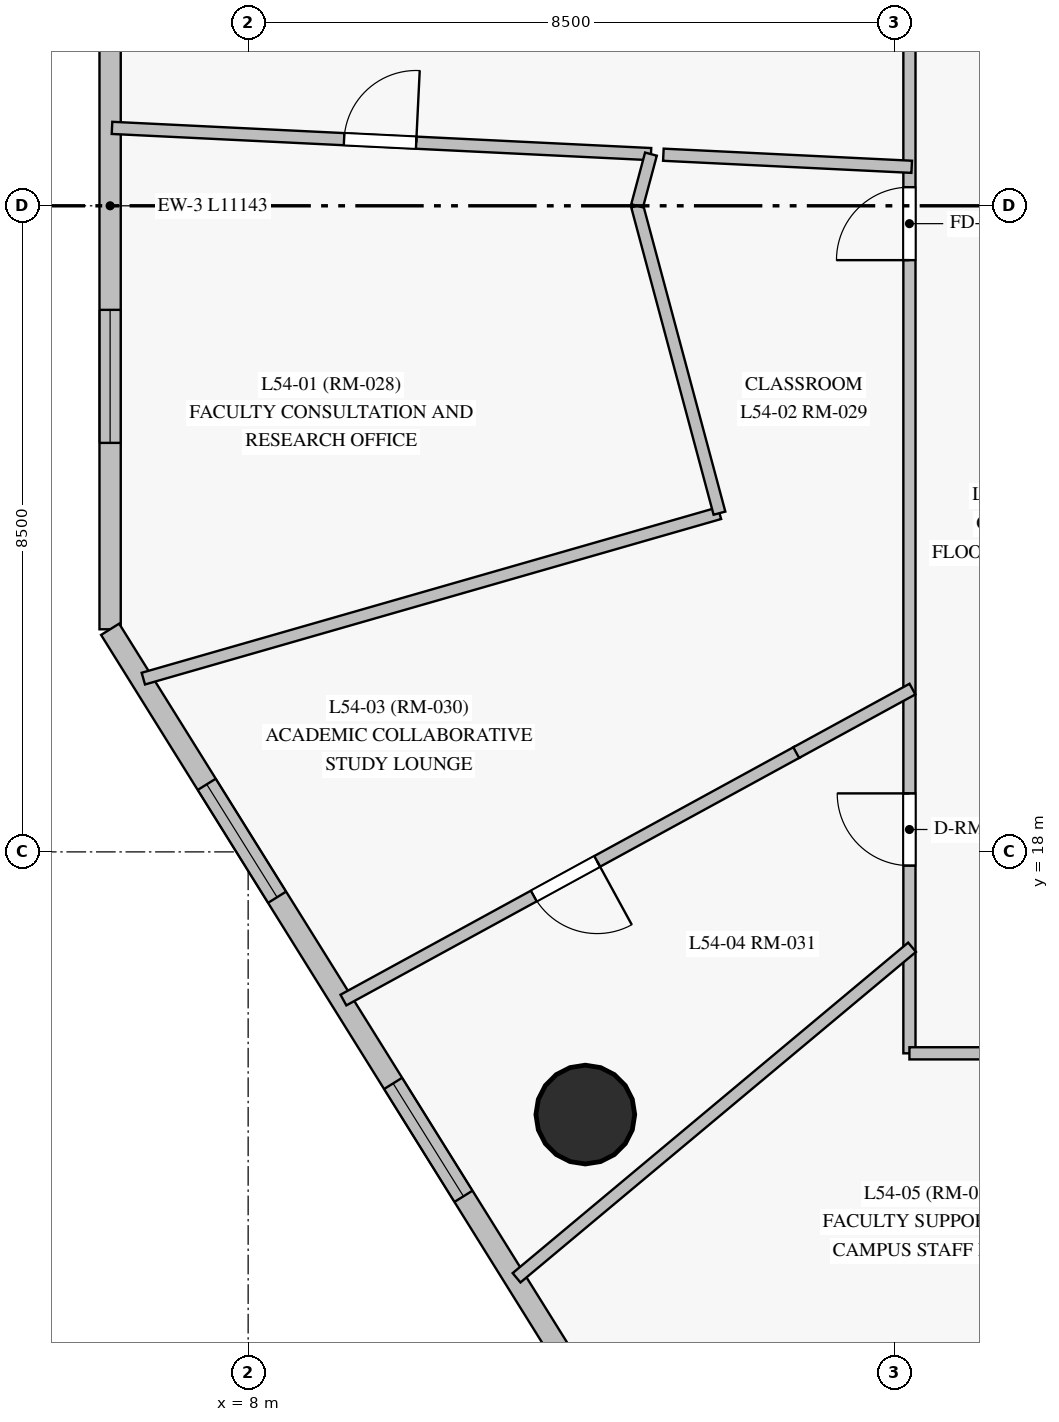
"""IFC4 building model, lengths in metres.
Left out: names, types, materials, properties, quantities, classifications, styles, units other than length and angle.
Written with IfcOpenShell. Run it as: python <this file> out.ifc"""

import sys

from ifc_helpers import new_model, si_unit, direction, frame, frame_2d, origin, origin_with_axes, origin_2d, place, context, subcontext, project, spatial, rectangle, circle, extrude, source, transform, mapped, element, fill, save


model = new_model("IFC4")
c1 = context("Model", 3, precision=1e-05, world=origin(), true_north=direction((0.0, 1.0)))
c2 = subcontext(c1, "Body", "Model", "MODEL_VIEW")
j1 = project(units=[si_unit("LENGTHUNIT", "METRE"), si_unit("PLANEANGLEUNIT", "RADIAN")], contexts=[c1])
p1 = place(None, origin())
s1 = spatial("IfcSite", under=j1, at=p1, CompositionType="ELEMENT")
p2 = place(p1, origin())
s2 = spatial("IfcBuilding", under=s1, at=p2, CompositionType="ELEMENT")
p3 = place(p2, frame((0.0, 0.0, 187.05)))
s3 = spatial("IfcBuildingStorey", under=s2, at=p3, CompositionType="ELEMENT", Elevation=187.05)
m1 = source(origin_with_axes(), c2, "Body", "SweptSolid", [
    extrude(circle(Radius=0.65, at=origin_2d()), origin(), (0.0, 0.0, 1.0), 3.05),
])
p4 = place(p3, frame((12.436, 14.544, 0.0), z_axis=(0.0, 0.0, 1.0), x_axis=(1.0, 0.0, 0.0)))
e1 = element("IfcColumn", 1, at=p4, inside=s3, PredefinedType="COLUMN", context=c2, shape_type="MappedRepresentation", body=[
    mapped(m1, transform((0.0, 0.0, 0.0), scale=1.0)),
])
p5 = place(p3, frame((6.184, 32.071, 0.0), z_axis=(0.0, 0.0, 1.0), x_axis=(0.0, -1.0, 0.0)))
e2 = element("IfcWall", 2, at=p5, inside=s3, PredefinedType="SOLIDWALL", context=c2, shape_type="SweptSolid", body=[
    extrude(rectangle(XDim=11.143, YDim=0.28, at=frame_2d((5.571, 0.0))), origin(), (0.0, 0.0, 1.0), 2.825),
])
p6 = place(p5, frame((1.429, 0.0, 0.85)))
e3 = element("IfcOpeningElement", 3, at=p6, cuts=e2, PredefinedType="OPENING", context=c2, shape_type="SweptSolid", body=[
    extrude(rectangle(XDim=1.75, YDim=1.65, at=frame_2d((0.875, 0.825))), frame((0.0, 0.15, 0.0), z_axis=(0.0, -1.0, 0.0), x_axis=(1.0, 0.0, 0.0)), (0.0, 0.0, 1.0), 0.3),
])
p7 = place(p5, frame((6.94, 0.0, 0.85)))
e4 = element("IfcOpeningElement", 4, at=p7, cuts=e2, PredefinedType="OPENING", context=c2, shape_type="SweptSolid", body=[
    extrude(rectangle(XDim=1.75, YDim=1.65, at=frame_2d((0.875, 0.825))), frame((0.0, 0.15, 0.0), z_axis=(0.0, -1.0, 0.0), x_axis=(1.0, 0.0, 0.0)), (0.0, 0.0, 1.0), 0.3),
])
p8 = place(p3, frame((6.184, 20.929, 0.0), z_axis=(0.0, 0.0, 1.0), x_axis=(0.52888179639, -0.848695496304, 0.0)))
e5 = element("IfcWall", 5, at=p8, inside=s3, PredefinedType="SOLIDWALL", context=c2, shape_type="SweptSolid", body=[
    extrude(rectangle(XDim=14.248, YDim=0.28, at=frame_2d((7.124, 0.0))), origin(), (0.0, 0.0, 1.0), 2.825),
])
p9 = place(p8, frame((2.403, 0.0, 0.85)))
e6 = element("IfcOpeningElement", 6, at=p9, cuts=e5, PredefinedType="OPENING", context=c2, shape_type="SweptSolid", body=[
    extrude(rectangle(XDim=1.75, YDim=1.65, at=frame_2d((0.875, 0.825))), frame((0.0, 0.15, 0.0), z_axis=(0.0, -1.0, 0.0), x_axis=(1.0, 0.0, 0.0)), (0.0, 0.0, 1.0), 0.3),
])
p10 = place(p8, frame((7.04, 0.0, 0.85)))
e7 = element("IfcOpeningElement", 7, at=p10, cuts=e5, PredefinedType="OPENING", context=c2, shape_type="SweptSolid", body=[
    extrude(rectangle(XDim=1.75, YDim=1.65, at=frame_2d((0.875, 0.825))), frame((0.0, 0.15, 0.0), z_axis=(0.0, -1.0, 0.0), x_axis=(1.0, 0.0, 0.0)), (0.0, 0.0, 1.0), 0.3),
])
p11 = place(p8, frame((11.251, 0.0, 0.85)))
e8 = element("IfcOpeningElement", 8, at=p11, cuts=e5, PredefinedType="OPENING", context=c2, shape_type="SweptSolid", body=[
    extrude(rectangle(XDim=1.75, YDim=1.65, at=frame_2d((0.875, 0.825))), frame((0.0, 0.15, 0.0), z_axis=(0.0, -1.0, 0.0), x_axis=(1.0, 0.0, 0.0)), (0.0, 0.0, 1.0), 0.3),
])
p12 = place(p3, frame((16.7, 15.35, 0.0), z_axis=(0.0, 0.0, 1.0), x_axis=(0.0, 1.0, 0.0)))
e9 = element("IfcWall", 9, at=p12, inside=s3, PredefinedType="PARTITIONING", context=c2, shape_type="SweptSolid", body=[
    extrude(rectangle(XDim=22.3, YDim=0.16, at=frame_2d((11.15, 0.0))), origin(), (0.0, 0.0, 1.0), 2.275),
])
p13 = place(p12, frame((10.435, 0.0, 0.0)))
e10 = element("IfcOpeningElement", 10, at=p13, cuts=e9, PredefinedType="OPENING", context=c2, shape_type="SweptSolid", body=[
    extrude(rectangle(XDim=0.96, YDim=2.15, at=frame_2d((0.48, 1.075))), frame((0.0, 0.09, 0.0), z_axis=(0.0, -1.0, 0.0), x_axis=(1.0, 0.0, 0.0)), (0.0, 0.0, 1.0), 0.18),
])
p14 = place(p12, frame((2.469, 0.0, 0.0)))
e11 = element("IfcOpeningElement", 11, at=p14, cuts=e9, PredefinedType="OPENING", context=c2, shape_type="SweptSolid", body=[
    extrude(rectangle(XDim=0.95, YDim=2.15, at=frame_2d((0.475, 1.075))), frame((0.0, 0.09, 0.0), z_axis=(0.0, -1.0, 0.0), x_axis=(1.0, 0.0, 0.0)), (0.0, 0.0, 1.0), 0.18),
])
p15 = place(p12, frame((16.25, 0.0, 0.0)))
e12 = element("IfcOpeningElement", 12, at=p15, cuts=e9, PredefinedType="OPENING", context=c2, shape_type="SweptSolid", body=[
    extrude(rectangle(XDim=0.95, YDim=2.15, at=frame_2d((0.475, 1.075))), frame((0.0, 0.09, 0.0), z_axis=(0.0, -1.0, 0.0), x_axis=(1.0, 0.0, 0.0)), (0.0, 0.0, 1.0), 0.18),
])
p16 = place(p12, frame((13.98, 0.0, 0.0)))
e13 = element("IfcOpeningElement", 13, at=p16, cuts=e9, PredefinedType="OPENING", context=c2, shape_type="SweptSolid", body=[
    extrude(rectangle(XDim=0.95, YDim=2.15, at=frame_2d((0.475, 1.075))), frame((0.0, 0.09, 0.0), z_axis=(0.0, -1.0, 0.0), x_axis=(1.0, 0.0, 0.0)), (0.0, 0.0, 1.0), 0.18),
])
p17 = place(p3, frame((27.55, 15.35, 0.0), z_axis=(0.0, 0.0, 1.0), x_axis=(-1.0, 0.0, 0.0)))
e14 = element("IfcWall", 14, at=p17, inside=s3, PredefinedType="PARTITIONING", context=c2, shape_type="SweptSolid", body=[
    extrude(rectangle(XDim=10.85, YDim=0.16, at=frame_2d((5.425, 0.0))), origin(), (0.0, 0.0, 1.0), 2.375),
])
p18 = place(p17, frame((6.968, 0.0, 0.0)))
e15 = element("IfcOpeningElement", 15, at=p18, cuts=e14, PredefinedType="OPENING", context=c2, shape_type="SweptSolid", body=[
    extrude(rectangle(XDim=0.95, YDim=2.15, at=frame_2d((0.475, 1.075))), frame((0.0, 0.09, 0.0), z_axis=(0.0, -1.0, 0.0), x_axis=(1.0, 0.0, 0.0)), (0.0, 0.0, 1.0), 0.18),
])
p19 = place(p17, frame((3.71, 0.0, 0.0)))
e16 = element("IfcOpeningElement", 16, at=p19, cuts=e14, PredefinedType="OPENING", context=c2, shape_type="SweptSolid", body=[
    extrude(rectangle(XDim=0.95, YDim=2.15, at=frame_2d((0.475, 1.075))), frame((0.0, 0.09, 0.0), z_axis=(0.0, -1.0, 0.0), x_axis=(1.0, 0.0, 0.0)), (0.0, 0.0, 1.0), 0.18),
])
p20 = place(p17, frame((2.032, 0.0, 0.0)))
e17 = element("IfcOpeningElement", 17, at=p20, cuts=e14, PredefinedType="OPENING", context=c2, shape_type="SweptSolid", body=[
    extrude(rectangle(XDim=0.95, YDim=2.15, at=frame_2d((0.475, 1.075))), frame((0.0, 0.09, 0.0), z_axis=(0.0, -1.0, 0.0), x_axis=(1.0, 0.0, 0.0)), (0.0, 0.0, 1.0), 0.18),
])
p21 = place(p17, frame((0.298, 0.0, 0.0)))
e18 = element("IfcOpeningElement", 18, at=p21, cuts=e14, PredefinedType="OPENING", context=c2, shape_type="SweptSolid", body=[
    extrude(rectangle(XDim=0.95, YDim=2.15, at=frame_2d((0.475, 1.075))), frame((0.0, 0.09, 0.0), z_axis=(0.0, -1.0, 0.0), x_axis=(1.0, 0.0, 0.0)), (0.0, 0.0, 1.0), 0.18),
])
p22 = place(p3, frame((21.199, 15.388, 0.0), z_axis=(0.0, 0.0, 1.0), x_axis=(-0.545344356307, -0.838212105045, 0.0)))
e19 = element("IfcWall", 19, at=p22, inside=s3, PredefinedType="PARTITIONING", context=c2, shape_type="SweptSolid", body=[
    extrude(rectangle(XDim=9.544, YDim=0.16, at=frame_2d((4.772, 0.0))), origin(), (0.0, 0.0, 1.0), 2.825),
])
p23 = place(p3, frame((14.201, 22.456, 0.0), z_axis=(0.0, 0.0, 1.0), x_axis=(-0.961149214353, -0.276029324073, 0.0)))
e20 = element("IfcWall", 20, at=p23, inside=s3, PredefinedType="PARTITIONING", context=c2, shape_type="SweptSolid", body=[
    extrude(rectangle(XDim=7.886, YDim=0.16, at=frame_2d((3.943, 0.0))), origin(), (0.0, 0.0, 1.0), 2.825),
])
p24 = place(p3, frame((6.209, 27.525, 0.0), z_axis=(0.0, 0.0, 1.0), x_axis=(0.998816837253, -0.048630500925, 0.0)))
e21 = element("IfcWall", 21, at=p24, inside=s3, PredefinedType="PARTITIONING", context=c2, shape_type="SweptSolid", body=[
    extrude(rectangle(XDim=7.099, YDim=0.16, at=frame_2d((3.549, 0.0))), origin(), (0.0, 0.0, 1.0), 2.825),
])
p25 = place(p24, frame((3.057, 0.0, 0.0)))
e22 = element("IfcOpeningElement", 22, at=p25, cuts=e21, PredefinedType="OPENING", context=c2, shape_type="SweptSolid", body=[
    extrude(rectangle(XDim=0.95, YDim=2.15, at=frame_2d((0.475, 1.075))), frame((0.0, 0.09, 0.0), z_axis=(0.0, -1.0, 0.0), x_axis=(1.0, 0.0, 0.0)), (0.0, 0.0, 1.0), 0.18),
])
p26 = place(p3, frame((16.735, 16.745, 0.0), z_axis=(0.0, 0.0, 1.0), x_axis=(-0.767314553754, -0.641270906558, 0.0)))
e23 = element("IfcWall", 23, at=p26, inside=s3, PredefinedType="PARTITIONING", context=c2, shape_type="SweptSolid", body=[
    extrude(rectangle(XDim=6.781, YDim=0.16, at=frame_2d((3.391, 0.0))), origin(), (0.0, 0.0, 1.0), 2.275),
])
p27 = place(p3, frame((15.228, 19.316, 0.0), z_axis=(0.0, 0.0, 1.0), x_axis=(-0.877523935838, -0.479532837282, 0.0)))
e24 = element("IfcWall", 24, at=p27, inside=s3, PredefinedType="PARTITIONING", context=c2, shape_type="SweptSolid", body=[
    extrude(rectangle(XDim=6.809, YDim=0.16, at=frame_2d((3.404, 0.0))), origin(), (0.0, 0.0, 1.0), 2.825),
])
p28 = place(p27, frame((3.004, 0.0, 0.0)))
e25 = element("IfcOpeningElement", 25, at=p28, cuts=e24, PredefinedType="OPENING", context=c2, shape_type="SweptSolid", body=[
    extrude(rectangle(XDim=0.95, YDim=2.15, at=frame_2d((0.475, 1.075))), frame((0.0, 0.09, 0.0), z_axis=(0.0, -1.0, 0.0), x_axis=(1.0, 0.0, 0.0)), (0.0, 0.0, 1.0), 0.18),
])
p29 = place(p3, frame((13.117, 26.5, 0.0), z_axis=(0.0, 0.0, 1.0), x_axis=(0.258802155336, -0.96593035173, 0.0)))
e26 = element("IfcWall", 26, at=p29, inside=s3, PredefinedType="PARTITIONING", context=c2, shape_type="SweptSolid", body=[
    extrude(rectangle(XDim=4.187, YDim=0.16, at=frame_2d((2.093, 0.0))), origin(), (0.0, 0.0, 1.0), 2.275),
])
p30 = place(p3, frame((13.463, 27.172, 0.0), z_axis=(0.0, 0.0, 1.0), x_axis=(0.998818809561, -0.048589974968, 0.0)))
e27 = element("IfcWall", 27, at=p30, inside=s3, PredefinedType="PARTITIONING", context=c2, shape_type="SweptSolid", body=[
    extrude(rectangle(XDim=3.271, YDim=0.16, at=frame_2d((1.635, 0.0))), origin(), (0.0, 0.0, 1.0), 2.825),
])
p31 = place(p3, frame((16.74, 20.142, 0.0), z_axis=(0.0, 0.0, 1.0), x_axis=(-0.877552641587, -0.479480303291, 0.0)))
e28 = element("IfcWall", 28, at=p31, inside=s3, PredefinedType="PARTITIONING", context=c2, shape_type="SweptSolid", body=[
    extrude(rectangle(XDim=1.742, YDim=0.16, at=frame_2d((0.871, 0.0))), origin(), (0.0, 0.0, 1.0), 2.825),
])
p32 = place(p3, frame((13.299, 27.18, 0.0), z_axis=(0.0, 0.0, 1.0), x_axis=(-0.258741864149, -0.965946503558, 0.0)))
e29 = element("IfcWall", 29, at=p32, inside=s3, PredefinedType="PARTITIONING", context=c2, shape_type="SweptSolid", body=[
    extrude(rectangle(XDim=0.704, YDim=0.16, at=frame_2d((0.352, 0.0))), origin(), (0.0, 0.0, 1.0), 2.275),
])
m2 = source(origin_with_axes(), c2, "Body", "SweptSolid", [
    extrude(rectangle(XDim=1.75, YDim=1.65, at=frame_2d((0.875, 0.825))), frame((0.0, 0.03, 0.0), z_axis=(0.0, -1.0, 0.0), x_axis=(1.0, 0.0, 0.0)), (0.0, 0.0, 1.0), 0.06),
])
p33 = place(p7, origin())
e30 = element("IfcWindow", 30, at=p33, inside=s3, PartitioningType="SINGLE_PANEL", PredefinedType="WINDOW", context=c2, shape_type="MappedRepresentation", body=[
    mapped(m2, transform((0.0, 0.0, 0.0), scale=1.0)),
])
fill(e4, e30)
p34 = place(p9, origin())
e31 = element("IfcWindow", 31, at=p34, inside=s3, PartitioningType="SINGLE_PANEL", PredefinedType="WINDOW", context=c2, shape_type="MappedRepresentation", body=[
    mapped(m2, transform((0.0, 0.0, 0.0), scale=1.0)),
])
fill(e6, e31)
p35 = place(p10, origin())
e32 = element("IfcWindow", 32, at=p35, inside=s3, PartitioningType="SINGLE_PANEL", PredefinedType="WINDOW", context=c2, shape_type="MappedRepresentation", body=[
    mapped(m2, transform((0.0, 0.0, 0.0), scale=1.0)),
])
fill(e7, e32)
m3 = source(origin_with_axes(), c2, "Body", "SweptSolid", [
    extrude(rectangle(XDim=0.96, YDim=2.15, at=frame_2d((0.48, 1.075))), frame((0.0, 0.025, 0.0), z_axis=(0.0, -1.0, 0.0), x_axis=(1.0, 0.0, 0.0)), (0.0, 0.0, 1.0), 0.05),
])
p36 = place(p13, origin())
e33 = element("IfcDoor", 33, at=p36, inside=s3, OperationType="SINGLE_SWING_LEFT", PredefinedType="DOOR", context=c2, shape_type="MappedRepresentation", body=[
    mapped(m3, transform((0.0, 0.0, 0.0), scale=1.0)),
])
fill(e10, e33)
m4 = source(origin_with_axes(), c2, "Body", "SweptSolid", [
    extrude(rectangle(XDim=0.95, YDim=2.15, at=frame_2d((0.475, 1.075))), frame((0.0, 0.025, 0.0), z_axis=(0.0, -1.0, 0.0), x_axis=(1.0, 0.0, 0.0)), (0.0, 0.0, 1.0), 0.05),
])
p37 = place(p14, origin())
e34 = element("IfcDoor", 34, at=p37, inside=s3, OperationType="SINGLE_SWING_RIGHT", PredefinedType="DOOR", context=c2, shape_type="MappedRepresentation", body=[
    mapped(m4, transform((0.0, 0.0, 0.0), scale=1.0)),
])
fill(e11, e34)
p38 = place(p25, origin())
e35 = element("IfcDoor", 35, at=p38, inside=s3, OperationType="SINGLE_SWING_RIGHT", PredefinedType="DOOR", context=c2, shape_type="MappedRepresentation", body=[
    mapped(m4, transform((0.0, 0.0, 0.0), scale=1.0)),
])
fill(e22, e35)
p39 = place(p28, origin())
e36 = element("IfcDoor", 36, at=p39, inside=s3, OperationType="SINGLE_SWING_LEFT", PredefinedType="DOOR", context=c2, shape_type="MappedRepresentation", body=[
    mapped(m4, transform((0.0, 0.0, 0.0), scale=1.0)),
])
fill(e25, e36)
save(model, sys.argv[1])
